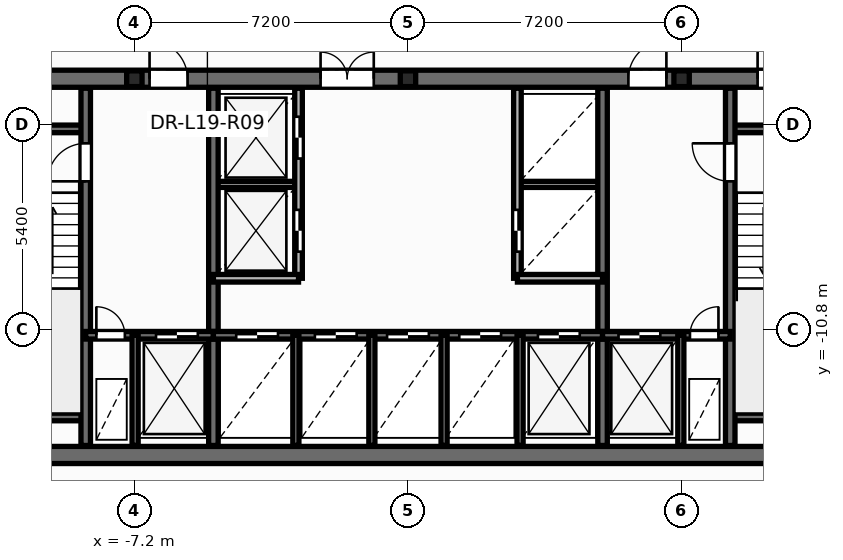
"""IFC4 building model, lengths in metres.
Left out: names, types, materials, properties, quantities, classifications, styles, units other than length and angle.
Written with IfcOpenShell. Run it as: python <this file> out.ifc"""

import sys

from ifc_helpers import new_model, si_unit, direction, frame, frame_2d, origin, origin_2d, place, context, subcontext, project, spatial, rectangle, i_section, extrude, element, fill, save


model = new_model("IFC4")
c1 = context("Model", 3, precision=1e-05, world=origin(), true_north=direction((0.0, 1.0)))
c2 = subcontext(c1, "Body", "Model", "MODEL_VIEW")
j1 = project(units=[si_unit("LENGTHUNIT", "METRE"), si_unit("PLANEANGLEUNIT", "RADIAN")], contexts=[c1])
p1 = place(None, origin())
s1 = spatial("IfcSite", under=j1, at=p1, CompositionType="ELEMENT")
p2 = place(p1, origin())
s2 = spatial("IfcBuilding", under=s1, at=p2, CompositionType="ELEMENT")
p3 = place(p2, frame((0.0, 0.0, 75.6)))
s3 = spatial("IfcBuildingStorey", under=s2, at=p3, CompositionType="ELEMENT", Elevation=75.6)
for number, where, z_axis, x_axis in (
    (1, (-7.2, -4.2, 0.0), (0.0, 0.0, 1.0), (1.0, 0.0, 0.0)),
    (2, (0.0, -4.2, 0.0), (0.0, 0.0, 1.0), (1.0, 0.0, 0.0)),
    (3, (7.2, -4.2, 0.0), (0.0, 0.0, 1.0), (1.0, 0.0, 0.0)),
):
    element("IfcColumn", number, at=place(p3, frame(where, z_axis=z_axis, x_axis=x_axis)), inside=s3, PredefinedType="PILASTER", context=c2, shape_type="SweptSolid", body=[
        extrude(i_section(OverallWidth=0.405, OverallDepth=0.414, WebThickness=0.022, FlangeThickness=0.032, at=origin_2d()), origin(), (0.0, 0.0, 1.0), 3.6),
    ])
for number, where, z_axis, x_axis in (
    (4, (-5.12, -6.98, 0.0), (0.0, 0.0, 1.0), (1.0, 0.0, 0.0)),
    (5, (2.88, -6.98, 0.0), (0.0, 0.0, 1.0), (1.0, 0.0, 0.0)),
):
    element("IfcWall", number, at=place(p3, frame(where, z_axis=z_axis, x_axis=x_axis)), inside=s3, PredefinedType="PARTITIONING", context=c2, shape_type="SweptSolid", body=[
        extrude(rectangle(XDim=2.24, YDim=0.16, at=frame_2d((1.12, 0.0))), origin(), (0.0, 0.0, 1.0), 3.35),
    ])
p4 = place(p3, frame((-12.65, -14.1, 0.0), z_axis=(0.0, 0.0, 1.0), x_axis=(1.0, 0.0, 0.0)))
e6 = element("IfcWall", 6, at=p4, inside=s3, PredefinedType="SHEAR", context=c2, shape_type="SweptSolid", body=[
    extrude(rectangle(XDim=25.3, YDim=0.45, at=frame_2d((12.65, 0.0))), origin(), (0.0, 0.0, 1.0), 3.6),
])
p5 = place(p3, frame((-12.65, -4.2, 0.0), z_axis=(0.0, 0.0, 1.0), x_axis=(1.0, 0.0, 0.0)))
e7 = element("IfcWall", 7, at=p5, inside=s3, PredefinedType="SHEAR", context=c2, shape_type="SweptSolid", body=[
    extrude(rectangle(XDim=25.3, YDim=0.45, at=frame_2d((12.65, 0.0))), origin(), (0.0, 0.0, 1.0), 3.6),
])
p6 = place(p5, frame((1.85, 0.0, 0.0)))
e8 = element("IfcOpeningElement", 8, at=p6, cuts=e7, PredefinedType="OPENING", context=c2, shape_type="SweptSolid", body=[
    extrude(rectangle(XDim=0.756, YDim=2.054, at=frame_2d((0.375, 1.027))), frame((0.0, 0.235, 0.0), z_axis=(0.0, -1.0, 0.0), x_axis=(1.0, 0.0, 0.0)), (0.0, 0.0, 1.0), 0.47),
])
p7 = place(p5, frame((21.85, 0.0, 0.0)))
e9 = element("IfcOpeningElement", 9, at=p7, cuts=e7, PredefinedType="OPENING", context=c2, shape_type="SweptSolid", body=[
    extrude(rectangle(XDim=0.756, YDim=2.054, at=frame_2d((0.375, 1.027))), frame((0.0, 0.235, 0.0), z_axis=(0.0, -1.0, 0.0), x_axis=(1.0, 0.0, 0.0)), (0.0, 0.0, 1.0), 0.47),
])
p8 = place(p5, frame((23.5, 0.0, 0.0)))
e10 = element("IfcOpeningElement", 10, at=p8, cuts=e7, PredefinedType="OPENING", context=c2, shape_type="SweptSolid", body=[
    extrude(rectangle(XDim=0.756, YDim=2.054, at=frame_2d((0.375, 1.027))), frame((0.0, 0.235, 0.0), z_axis=(0.0, -1.0, 0.0), x_axis=(1.0, 0.0, 0.0)), (0.0, 0.0, 1.0), 0.47),
])
p9 = place(p5, frame((5.85, 0.0, 0.0)))
e11 = element("IfcOpeningElement", 11, at=p9, cuts=e7, PredefinedType="OPENING", context=c2, shape_type="SweptSolid", body=[
    extrude(rectangle(XDim=1.006, YDim=2.104, at=frame_2d((0.5, 1.052))), frame((0.0, 0.235, 0.0), z_axis=(0.0, -1.0, 0.0), x_axis=(1.0, 0.0, 0.0)), (0.0, 0.0, 1.0), 0.47),
])
p10 = place(p5, frame((10.35, 0.0, 0.0)))
e12 = element("IfcOpeningElement", 12, at=p10, cuts=e7, PredefinedType="OPENING", context=c2, shape_type="SweptSolid", body=[
    extrude(rectangle(XDim=1.406, YDim=2.154, at=frame_2d((0.7, 1.077))), frame((0.0, 0.235, 0.0), z_axis=(0.0, -1.0, 0.0), x_axis=(1.0, 0.0, 0.0)), (0.0, 0.0, 1.0), 0.47),
])
p11 = place(p5, frame((18.45, 0.0, 0.0)))
e13 = element("IfcOpeningElement", 13, at=p11, cuts=e7, PredefinedType="OPENING", context=c2, shape_type="SweptSolid", body=[
    extrude(rectangle(XDim=1.006, YDim=2.104, at=frame_2d((0.5, 1.052))), frame((0.0, 0.235, 0.0), z_axis=(0.0, -1.0, 0.0), x_axis=(1.0, 0.0, 0.0)), (0.0, 0.0, 1.0), 0.47),
])
for number, where, z_axis, x_axis in (
    (14, (-12.35, -5.52, 0.0), (0.0, 0.0, 1.0), (1.0, 0.0, 0.0)),
    (15, (-12.35, -13.1, 0.0), (0.0, 0.0, 1.0), (1.0, 0.0, 0.0)),
    (16, (8.48, -5.52, 0.0), (0.0, 0.0, 1.0), (1.0, 0.0, 0.0)),
    (17, (8.48, -13.1, 0.0), (0.0, 0.0, 1.0), (1.0, 0.0, 0.0)),
):
    element("IfcWall", number, at=place(p3, frame(where, z_axis=z_axis, x_axis=x_axis)), inside=s3, PredefinedType="SOLIDWALL", context=c2, shape_type="SweptSolid", body=[
        extrude(rectangle(XDim=3.87, YDim=0.2, at=frame_2d((1.935, 0.0))), origin(), (0.0, 0.0, 1.0), 3.6),
    ])
p12 = place(p3, frame((-8.48, -13.85, 0.0), z_axis=(0.0, 0.0, 1.0), x_axis=(0.0, 1.0, 0.0)))
e18 = element("IfcWall", 18, at=p12, inside=s3, PredefinedType="SHEAR", context=c2, shape_type="SweptSolid", body=[
    extrude(rectangle(XDim=9.4, YDim=0.25, at=frame_2d((4.7, 0.0))), origin(), (0.0, 0.0, 1.0), 3.6),
])
p13 = place(p12, frame((6.95, 0.0, 0.0)))
e19 = element("IfcOpeningElement", 19, at=p13, cuts=e18, PredefinedType="OPENING", context=c2, shape_type="SweptSolid", body=[
    extrude(rectangle(XDim=1.006, YDim=2.104, at=frame_2d((0.5, 1.052))), frame((0.0, 0.135, 0.0), z_axis=(0.0, -1.0, 0.0), x_axis=(1.0, 0.0, 0.0)), (0.0, 0.0, 1.0), 0.27),
])
p14 = place(p3, frame((8.48, -13.85, 0.0), z_axis=(0.0, 0.0, 1.0), x_axis=(0.0, 1.0, 0.0)))
e20 = element("IfcWall", 20, at=p14, inside=s3, PredefinedType="SHEAR", context=c2, shape_type="SweptSolid", body=[
    extrude(rectangle(XDim=9.4, YDim=0.25, at=frame_2d((4.7, 0.0))), origin(), (0.0, 0.0, 1.0), 3.6),
])
p15 = place(p14, frame((6.95, 0.0, 0.0)))
e21 = element("IfcOpeningElement", 21, at=p15, cuts=e20, PredefinedType="OPENING", context=c2, shape_type="SweptSolid", body=[
    extrude(rectangle(XDim=1.006, YDim=2.104, at=frame_2d((0.5, 1.052))), frame((0.0, 0.135, 0.0), z_axis=(0.0, -1.0, 0.0), x_axis=(1.0, 0.0, 0.0)), (0.0, 0.0, 1.0), 0.27),
])
for number, where, z_axis, x_axis in (
    (22, (-5.12, -13.85, 0.0), (0.0, 0.0, 1.0), (0.0, 1.0, 0.0)),
    (23, (5.12, -13.85, 0.0), (0.0, 0.0, 1.0), (0.0, 1.0, 0.0)),
):
    element("IfcWall", number, at=place(p3, frame(where, z_axis=z_axis, x_axis=x_axis)), inside=s3, PredefinedType="SHEAR", context=c2, shape_type="SweptSolid", body=[
        extrude(rectangle(XDim=9.4, YDim=0.25, at=frame_2d((4.7, 0.0))), origin(), (0.0, 0.0, 1.0), 3.6),
    ])
p16 = place(p3, frame((-8.48, -10.95, 0.0), z_axis=(0.0, 0.0, 1.0), x_axis=(1.0, 0.0, 0.0)))
e24 = element("IfcWall", 24, at=p16, inside=s3, PredefinedType="SOLIDWALL", context=c2, shape_type="SweptSolid", body=[
    extrude(rectangle(XDim=3.36, YDim=0.2, at=frame_2d((1.68, 0.0))), origin(), (0.0, 0.0, 1.0), 3.6),
])
p17 = place(p16, frame((0.28, 0.0, 0.0)))
e25 = element("IfcOpeningElement", 25, at=p17, cuts=e24, PredefinedType="OPENING", context=c2, shape_type="SweptSolid", body=[
    extrude(rectangle(XDim=0.756, YDim=2.054, at=frame_2d((0.375, 1.027))), frame((0.0, 0.11, 0.0), z_axis=(0.0, -1.0, 0.0), x_axis=(1.0, 0.0, 0.0)), (0.0, 0.0, 1.0), 0.22),
])
p18 = place(p16, frame((1.85, 0.0, 0.0)))
e26 = element("IfcOpeningElement", 26, at=p18, cuts=e24, PredefinedType="OPENING", context=c2, shape_type="SweptSolid", body=[
    extrude(rectangle(XDim=1.106, YDim=2.104, at=frame_2d((0.55, 1.052))), frame((0.0, 0.11, 0.0), z_axis=(0.0, -1.0, 0.0), x_axis=(1.0, 0.0, 0.0)), (0.0, 0.0, 1.0), 0.22),
])
p19 = place(p3, frame((-5.12, -10.95, 0.0), z_axis=(0.0, 0.0, 1.0), x_axis=(1.0, 0.0, 0.0)))
e27 = element("IfcWall", 27, at=p19, inside=s3, PredefinedType="SOLIDWALL", context=c2, shape_type="SweptSolid", body=[
    extrude(rectangle(XDim=10.24, YDim=0.2, at=frame_2d((5.12, 0.0))), origin(), (0.0, 0.0, 1.0), 3.6),
])
p20 = place(p19, frame((0.6, 0.0, 0.0)))
e28 = element("IfcOpeningElement", 28, at=p20, cuts=e27, PredefinedType="OPENING", context=c2, shape_type="SweptSolid", body=[
    extrude(rectangle(XDim=1.106, YDim=2.104, at=frame_2d((0.55, 1.052))), frame((0.0, 0.11, 0.0), z_axis=(0.0, -1.0, 0.0), x_axis=(1.0, 0.0, 0.0)), (0.0, 0.0, 1.0), 0.22),
])
p21 = place(p19, frame((2.67, 0.0, 0.0)))
e29 = element("IfcOpeningElement", 29, at=p21, cuts=e27, PredefinedType="OPENING", context=c2, shape_type="SweptSolid", body=[
    extrude(rectangle(XDim=1.106, YDim=2.104, at=frame_2d((0.55, 1.052))), frame((0.0, 0.11, 0.0), z_axis=(0.0, -1.0, 0.0), x_axis=(1.0, 0.0, 0.0)), (0.0, 0.0, 1.0), 0.22),
])
p22 = place(p19, frame((4.57, 0.0, 0.0)))
e30 = element("IfcOpeningElement", 30, at=p22, cuts=e27, PredefinedType="OPENING", context=c2, shape_type="SweptSolid", body=[
    extrude(rectangle(XDim=1.106, YDim=2.104, at=frame_2d((0.55, 1.052))), frame((0.0, 0.11, 0.0), z_axis=(0.0, -1.0, 0.0), x_axis=(1.0, 0.0, 0.0)), (0.0, 0.0, 1.0), 0.22),
])
p23 = place(p19, frame((6.47, 0.0, 0.0)))
e31 = element("IfcOpeningElement", 31, at=p23, cuts=e27, PredefinedType="OPENING", context=c2, shape_type="SweptSolid", body=[
    extrude(rectangle(XDim=1.106, YDim=2.104, at=frame_2d((0.55, 1.052))), frame((0.0, 0.11, 0.0), z_axis=(0.0, -1.0, 0.0), x_axis=(1.0, 0.0, 0.0)), (0.0, 0.0, 1.0), 0.22),
])
p24 = place(p19, frame((8.54, 0.0, 0.0)))
e32 = element("IfcOpeningElement", 32, at=p24, cuts=e27, PredefinedType="OPENING", context=c2, shape_type="SweptSolid", body=[
    extrude(rectangle(XDim=1.106, YDim=2.104, at=frame_2d((0.55, 1.052))), frame((0.0, 0.11, 0.0), z_axis=(0.0, -1.0, 0.0), x_axis=(1.0, 0.0, 0.0)), (0.0, 0.0, 1.0), 0.22),
])
p25 = place(p3, frame((5.12, -10.95, 0.0), z_axis=(0.0, 0.0, 1.0), x_axis=(1.0, 0.0, 0.0)))
e33 = element("IfcWall", 33, at=p25, inside=s3, PredefinedType="SOLIDWALL", context=c2, shape_type="SweptSolid", body=[
    extrude(rectangle(XDim=3.36, YDim=0.2, at=frame_2d((1.68, 0.0))), origin(), (0.0, 0.0, 1.0), 3.6),
])
p26 = place(p25, frame((0.42, 0.0, 0.0)))
e34 = element("IfcOpeningElement", 34, at=p26, cuts=e33, PredefinedType="OPENING", context=c2, shape_type="SweptSolid", body=[
    extrude(rectangle(XDim=1.106, YDim=2.104, at=frame_2d((0.55, 1.052))), frame((0.0, 0.11, 0.0), z_axis=(0.0, -1.0, 0.0), x_axis=(1.0, 0.0, 0.0)), (0.0, 0.0, 1.0), 0.22),
])
p27 = place(p25, frame((2.3, 0.0, 0.0)))
e35 = element("IfcOpeningElement", 35, at=p27, cuts=e33, PredefinedType="OPENING", context=c2, shape_type="SweptSolid", body=[
    extrude(rectangle(XDim=0.756, YDim=2.054, at=frame_2d((0.375, 1.027))), frame((0.0, 0.11, 0.0), z_axis=(0.0, -1.0, 0.0), x_axis=(1.0, 0.0, 0.0)), (0.0, 0.0, 1.0), 0.22),
])
for number, where, z_axis, x_axis in (
    (36, (-7.18, -13.85, 0.0), (0.0, 0.0, 1.0), (0.0, 1.0, 0.0)),
    (37, (7.18, -13.85, 0.0), (0.0, 0.0, 1.0), (0.0, 1.0, 0.0)),
    (38, (-2.95, -13.85, 0.0), (0.0, 0.0, 1.0), (0.0, 1.0, 0.0)),
    (39, (2.95, -13.85, 0.0), (0.0, 0.0, 1.0), (0.0, 1.0, 0.0)),
):
    element("IfcWall", number, at=place(p3, frame(where, z_axis=z_axis, x_axis=x_axis)), inside=s3, PredefinedType="PARTITIONING", context=c2, shape_type="SweptSolid", body=[
        extrude(rectangle(XDim=2.9, YDim=0.16, at=frame_2d((1.45, 0.0))), origin(), (0.0, 0.0, 1.0), 2.375),
    ])
p28 = place(p3, frame((-2.88, -9.45, 0.0), z_axis=(0.0, 0.0, 1.0), x_axis=(0.0, 1.0, 0.0)))
e40 = element("IfcWall", 40, at=p28, inside=s3, PredefinedType="SOLIDWALL", context=c2, shape_type="SweptSolid", body=[
    extrude(rectangle(XDim=5.0, YDim=0.2, at=frame_2d((2.5, 0.0))), origin(), (0.0, 0.0, 1.0), 3.35),
])
p29 = place(p28, frame((0.7, 0.0, 0.0)))
e41 = element("IfcOpeningElement", 41, at=p29, cuts=e40, PredefinedType="OPENING", context=c2, shape_type="SweptSolid", body=[
    extrude(rectangle(XDim=1.106, YDim=2.104, at=frame_2d((0.55, 1.052))), frame((0.0, 0.11, 0.0), z_axis=(0.0, -1.0, 0.0), x_axis=(1.0, 0.0, 0.0)), (0.0, 0.0, 1.0), 0.22),
])
p30 = place(p28, frame((3.15, 0.0, 0.0)))
e42 = element("IfcOpeningElement", 42, at=p30, cuts=e40, PredefinedType="OPENING", context=c2, shape_type="SweptSolid", body=[
    extrude(rectangle(XDim=1.106, YDim=2.104, at=frame_2d((0.55, 1.052))), frame((0.0, 0.11, 0.0), z_axis=(0.0, -1.0, 0.0), x_axis=(1.0, 0.0, 0.0)), (0.0, 0.0, 1.0), 0.22),
])
p31 = place(p3, frame((-5.12, -9.45, 0.0), z_axis=(0.0, 0.0, 1.0), x_axis=(1.0, 0.0, 0.0)))
e43 = element("IfcWall", 43, at=p31, inside=s3, PredefinedType="SOLIDWALL", context=c2, shape_type="SweptSolid", body=[
    extrude(rectangle(XDim=2.24, YDim=0.2, at=frame_2d((1.12, 0.0))), origin(), (0.0, 0.0, 1.0), 3.35),
])
p32 = place(p3, frame((2.88, -9.45, 0.0), z_axis=(0.0, 0.0, 1.0), x_axis=(0.0, 1.0, 0.0)))
e44 = element("IfcWall", 44, at=p32, inside=s3, PredefinedType="SOLIDWALL", context=c2, shape_type="SweptSolid", body=[
    extrude(rectangle(XDim=5.0, YDim=0.2, at=frame_2d((2.5, 0.0))), origin(), (0.0, 0.0, 1.0), 3.35),
])
p33 = place(p32, frame((0.7, 0.0, 0.0)))
e45 = element("IfcOpeningElement", 45, at=p33, cuts=e44, PredefinedType="OPENING", context=c2, shape_type="SweptSolid", body=[
    extrude(rectangle(XDim=1.106, YDim=2.104, at=frame_2d((0.55, 1.052))), frame((0.0, 0.11, 0.0), z_axis=(0.0, -1.0, 0.0), x_axis=(1.0, 0.0, 0.0)), (0.0, 0.0, 1.0), 0.22),
])
p34 = place(p3, frame((2.88, -9.45, 0.0), z_axis=(0.0, 0.0, 1.0), x_axis=(1.0, 0.0, 0.0)))
e46 = element("IfcWall", 46, at=p34, inside=s3, PredefinedType="SOLIDWALL", context=c2, shape_type="SweptSolid", body=[
    extrude(rectangle(XDim=2.24, YDim=0.2, at=frame_2d((1.12, 0.0))), origin(), (0.0, 0.0, 1.0), 3.35),
])
for number, where, z_axis, x_axis in (
    (47, (-0.95, -13.85, 0.0), (0.0, 0.0, 1.0), (0.0, 1.0, 0.0)),
    (48, (0.95, -13.85, 0.0), (0.0, 0.0, 1.0), (0.0, 1.0, 0.0)),
):
    element("IfcWall", number, at=place(p3, frame(where, z_axis=z_axis, x_axis=x_axis)), inside=s3, PredefinedType="PARTITIONING", context=c2, shape_type="SweptSolid", body=[
        extrude(rectangle(XDim=2.9, YDim=0.16, at=frame_2d((1.45, 0.0))), origin(), (0.0, 0.0, 1.0), 2.375),
    ])
p35 = place(p29, origin())
e49 = element("IfcDoor", 49, at=p35, inside=s3, OperationType="DOUBLE_DOOR_SLIDING", PredefinedType="DOOR", context=c2, shape_type="SweptSolid", body=[
    extrude(rectangle(XDim=1.1, YDim=2.1, at=frame_2d((0.55, 1.05))), frame((0.0, 0.025, 0.0), z_axis=(0.0, -1.0, 0.0), x_axis=(1.0, 0.0, 0.0)), (0.0, 0.0, 1.0), 0.05),
])
fill(e41, e49)
p36 = place(p30, origin())
e50 = element("IfcDoor", 50, at=p36, inside=s3, OperationType="DOUBLE_DOOR_SLIDING", PredefinedType="DOOR", context=c2, shape_type="SweptSolid", body=[
    extrude(rectangle(XDim=1.1, YDim=2.1, at=frame_2d((0.55, 1.05))), frame((0.0, 0.025, 0.0), z_axis=(0.0, -1.0, 0.0), x_axis=(1.0, 0.0, 0.0)), (0.0, 0.0, 1.0), 0.05),
])
fill(e42, e50)
p37 = place(p33, origin())
e51 = element("IfcDoor", 51, at=p37, inside=s3, OperationType="DOUBLE_DOOR_SLIDING", PredefinedType="DOOR", context=c2, shape_type="SweptSolid", body=[
    extrude(rectangle(XDim=1.1, YDim=2.1, at=frame_2d((0.55, 1.05))), frame((0.0, 0.025, 0.0), z_axis=(0.0, -1.0, 0.0), x_axis=(1.0, 0.0, 0.0)), (0.0, 0.0, 1.0), 0.05),
])
fill(e45, e51)
p38 = place(p13, origin())
e52 = element("IfcDoor", 52, at=p38, inside=s3, OperationType="SINGLE_SWING_LEFT", PredefinedType="DOOR", context=c2, shape_type="SweptSolid", body=[
    extrude(rectangle(XDim=1.0, YDim=2.1, at=frame_2d((0.5, 1.05))), frame((0.0, 0.025, 0.0), z_axis=(0.0, -1.0, 0.0), x_axis=(1.0, 0.0, 0.0)), (0.0, 0.0, 1.0), 0.05),
])
fill(e19, e52)
p39 = place(p15, origin())
e53 = element("IfcDoor", 53, at=p39, inside=s3, OperationType="SINGLE_SWING_RIGHT", PredefinedType="DOOR", context=c2, shape_type="SweptSolid", body=[
    extrude(rectangle(XDim=1.0, YDim=2.1, at=frame_2d((0.5, 1.05))), frame((0.0, 0.025, 0.0), z_axis=(0.0, -1.0, 0.0), x_axis=(1.0, 0.0, 0.0)), (0.0, 0.0, 1.0), 0.05),
])
fill(e21, e53)
p40 = place(p17, origin())
e54 = element("IfcDoor", 54, at=p40, inside=s3, OperationType="SINGLE_SWING_LEFT", PredefinedType="DOOR", context=c2, shape_type="SweptSolid", body=[
    extrude(rectangle(XDim=0.75, YDim=2.05, at=frame_2d((0.375, 1.025))), frame((0.0, 0.025, 0.0), z_axis=(0.0, -1.0, 0.0), x_axis=(1.0, 0.0, 0.0)), (0.0, 0.0, 1.0), 0.05),
])
fill(e25, e54)
p41 = place(p18, origin())
e55 = element("IfcDoor", 55, at=p41, inside=s3, OperationType="DOUBLE_DOOR_SLIDING", PredefinedType="DOOR", context=c2, shape_type="SweptSolid", body=[
    extrude(rectangle(XDim=1.1, YDim=2.1, at=frame_2d((0.55, 1.05))), frame((0.0, 0.025, 0.0), z_axis=(0.0, -1.0, 0.0), x_axis=(1.0, 0.0, 0.0)), (0.0, 0.0, 1.0), 0.05),
])
fill(e26, e55)
p42 = place(p26, origin())
e56 = element("IfcDoor", 56, at=p42, inside=s3, OperationType="DOUBLE_DOOR_SLIDING", PredefinedType="DOOR", context=c2, shape_type="SweptSolid", body=[
    extrude(rectangle(XDim=1.1, YDim=2.1, at=frame_2d((0.55, 1.05))), frame((0.0, 0.025, 0.0), z_axis=(0.0, -1.0, 0.0), x_axis=(1.0, 0.0, 0.0)), (0.0, 0.0, 1.0), 0.05),
])
fill(e34, e56)
p43 = place(p27, origin())
e57 = element("IfcDoor", 57, at=p43, inside=s3, OperationType="SINGLE_SWING_RIGHT", PredefinedType="DOOR", context=c2, shape_type="SweptSolid", body=[
    extrude(rectangle(XDim=0.75, YDim=2.05, at=frame_2d((0.375, 1.025))), frame((0.0, 0.025, 0.0), z_axis=(0.0, -1.0, 0.0), x_axis=(1.0, 0.0, 0.0)), (0.0, 0.0, 1.0), 0.05),
])
fill(e35, e57)
p44 = place(p20, origin())
e58 = element("IfcDoor", 58, at=p44, inside=s3, OperationType="DOUBLE_DOOR_SLIDING", PredefinedType="DOOR", context=c2, shape_type="SweptSolid", body=[
    extrude(rectangle(XDim=1.1, YDim=2.1, at=frame_2d((0.55, 1.05))), frame((0.0, 0.025, 0.0), z_axis=(0.0, -1.0, 0.0), x_axis=(1.0, 0.0, 0.0)), (0.0, 0.0, 1.0), 0.05),
])
fill(e28, e58)
p45 = place(p21, origin())
e59 = element("IfcDoor", 59, at=p45, inside=s3, OperationType="DOUBLE_DOOR_SLIDING", PredefinedType="DOOR", context=c2, shape_type="SweptSolid", body=[
    extrude(rectangle(XDim=1.1, YDim=2.1, at=frame_2d((0.55, 1.05))), frame((0.0, 0.025, 0.0), z_axis=(0.0, -1.0, 0.0), x_axis=(1.0, 0.0, 0.0)), (0.0, 0.0, 1.0), 0.05),
])
fill(e29, e59)
p46 = place(p22, origin())
e60 = element("IfcDoor", 60, at=p46, inside=s3, OperationType="DOUBLE_DOOR_SLIDING", PredefinedType="DOOR", context=c2, shape_type="SweptSolid", body=[
    extrude(rectangle(XDim=1.1, YDim=2.1, at=frame_2d((0.55, 1.05))), frame((0.0, 0.025, 0.0), z_axis=(0.0, -1.0, 0.0), x_axis=(1.0, 0.0, 0.0)), (0.0, 0.0, 1.0), 0.05),
])
fill(e30, e60)
p47 = place(p23, origin())
e61 = element("IfcDoor", 61, at=p47, inside=s3, OperationType="DOUBLE_DOOR_SLIDING", PredefinedType="DOOR", context=c2, shape_type="SweptSolid", body=[
    extrude(rectangle(XDim=1.1, YDim=2.1, at=frame_2d((0.55, 1.05))), frame((0.0, 0.025, 0.0), z_axis=(0.0, -1.0, 0.0), x_axis=(1.0, 0.0, 0.0)), (0.0, 0.0, 1.0), 0.05),
])
fill(e31, e61)
p48 = place(p24, origin())
e62 = element("IfcDoor", 62, at=p48, inside=s3, OperationType="DOUBLE_DOOR_SLIDING", PredefinedType="DOOR", context=c2, shape_type="SweptSolid", body=[
    extrude(rectangle(XDim=1.1, YDim=2.1, at=frame_2d((0.55, 1.05))), frame((0.0, 0.025, 0.0), z_axis=(0.0, -1.0, 0.0), x_axis=(1.0, 0.0, 0.0)), (0.0, 0.0, 1.0), 0.05),
])
fill(e32, e62)
p49 = place(p7, origin())
e63 = element("IfcDoor", 63, at=p49, inside=s3, OperationType="SINGLE_SWING_LEFT", PredefinedType="DOOR", context=c2, shape_type="SweptSolid", body=[
    extrude(rectangle(XDim=0.75, YDim=2.05, at=frame_2d((0.375, 1.025))), frame((0.0, 0.025, 0.0), z_axis=(0.0, -1.0, 0.0), x_axis=(1.0, 0.0, 0.0)), (0.0, 0.0, 1.0), 0.05),
])
fill(e9, e63)
p50 = place(p9, origin())
e64 = element("IfcDoor", 64, at=p50, inside=s3, OperationType="SINGLE_SWING_LEFT", PredefinedType="DOOR", context=c2, shape_type="SweptSolid", body=[
    extrude(rectangle(XDim=1.0, YDim=2.1, at=frame_2d((0.5, 1.05))), frame((0.0, 0.025, 0.0), z_axis=(0.0, -1.0, 0.0), x_axis=(1.0, 0.0, 0.0)), (0.0, 0.0, 1.0), 0.05),
])
fill(e11, e64)
p51 = place(p10, origin())
e65 = element("IfcDoor", 65, at=p51, inside=s3, OperationType="DOUBLE_DOOR_SINGLE_SWING", PredefinedType="DOOR", context=c2, shape_type="SweptSolid", body=[
    extrude(rectangle(XDim=1.4, YDim=2.15, at=frame_2d((0.7, 1.075))), frame((0.0, 0.025, 0.0), z_axis=(0.0, -1.0, 0.0), x_axis=(1.0, 0.0, 0.0)), (0.0, 0.0, 1.0), 0.05),
])
fill(e12, e65)
p52 = place(p11, origin())
e66 = element("IfcDoor", 66, at=p52, inside=s3, OperationType="SINGLE_SWING_RIGHT", PredefinedType="DOOR", context=c2, shape_type="SweptSolid", body=[
    extrude(rectangle(XDim=1.0, YDim=2.1, at=frame_2d((0.5, 1.05))), frame((0.0, 0.025, 0.0), z_axis=(0.0, -1.0, 0.0), x_axis=(1.0, 0.0, 0.0)), (0.0, 0.0, 1.0), 0.05),
])
fill(e13, e66)
save(model, sys.argv[1])
